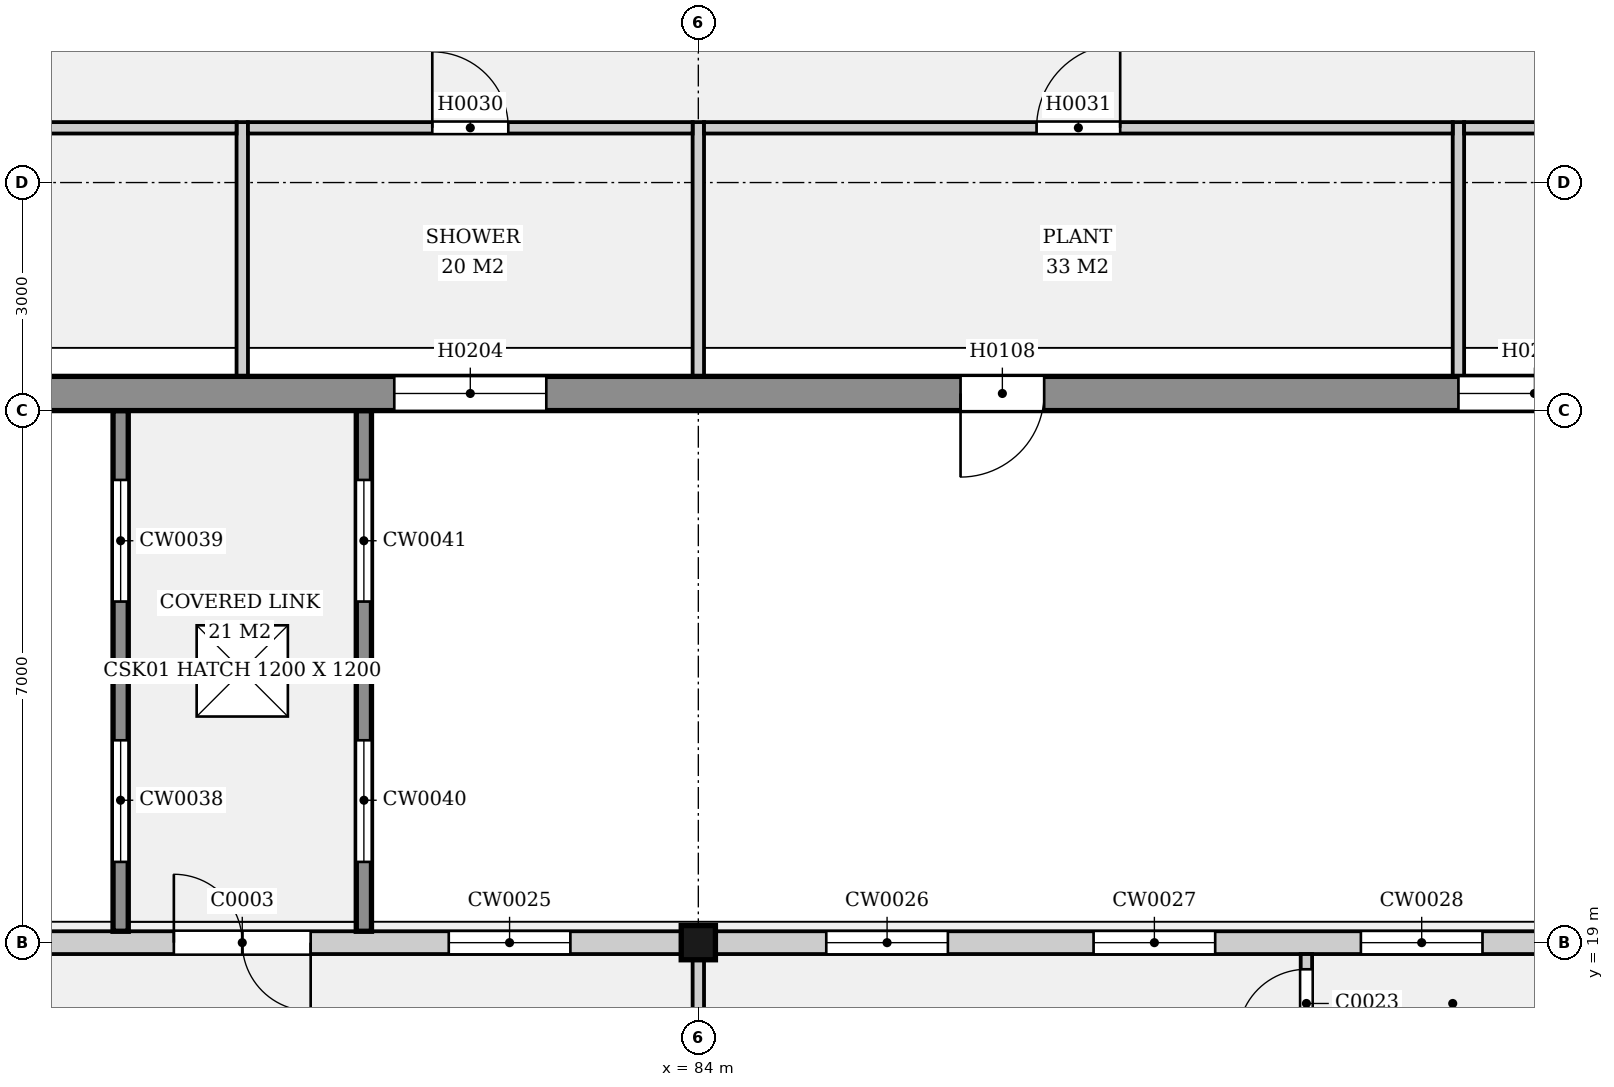
"""IFC4 building model, lengths in metres.
Left out: names, types, materials, properties, quantities, classifications, styles, units other than length and angle.
Written with IfcOpenShell. Run it as: python <this file> out.ifc"""

import sys

from ifc_helpers import new_model, si_unit, direction, frame, frame_2d, origin, origin_2d, place, context, subcontext, project, spatial, rectangle, extrude, element, fill, save


model = new_model("IFC4")
c1 = context("Model", 3, precision=1e-05, world=origin(), true_north=direction((0.0, 1.0)))
c2 = subcontext(c1, "Body", "Model", "MODEL_VIEW")
j1 = project(units=[si_unit("LENGTHUNIT", "METRE"), si_unit("PLANEANGLEUNIT", "RADIAN")], contexts=[c1])
p1 = place(None, origin())
s1 = spatial("IfcSite", under=j1, at=p1, CompositionType="ELEMENT")
p2 = place(p1, origin())
s2 = spatial("IfcBuilding", under=s1, at=p2, CompositionType="ELEMENT")
p3 = place(p2, origin())
s3 = spatial("IfcBuildingStorey", under=s2, at=p3, CompositionType="ELEMENT", Elevation=0.0)
p4 = place(p3, frame((64.0, 26.225, 0.0), z_axis=(0.0, 0.0, 1.0), x_axis=(1.0, 0.0, 0.0)))
e1 = element("IfcWall", 1, at=p4, inside=s3, PredefinedType="ELEMENTEDWALL", context=c2, shape_type="SweptSolid", body=[
    extrude(rectangle(XDim=76.0, YDim=0.45, at=frame_2d((38.0, 0.0))), origin(), (0.0, 0.0, 1.0), 5.0),
])
p5 = place(p4, frame((10.55, 0.0, 0.0), z_axis=(0.0, 0.0, 1.0), x_axis=(-1.0, 0.0, 0.0)))
e2 = element("IfcOpeningElement", 2, at=p5, cuts=e1, PredefinedType="OPENING", context=c2, shape_type="SweptSolid", body=[
    extrude(rectangle(XDim=1.1, YDim=2.2, at=frame_2d((0.55, 1.1))), frame((0.0, 0.235, 0.0), z_axis=(0.0, -1.0, 0.0), x_axis=(1.0, 0.0, 0.0)), (0.0, 0.0, 1.0), 0.47),
])
p6 = place(p4, frame((24.55, 0.0, 0.0), z_axis=(0.0, 0.0, 1.0), x_axis=(-1.0, 0.0, 0.0)))
e3 = element("IfcOpeningElement", 3, at=p6, cuts=e1, PredefinedType="OPENING", context=c2, shape_type="SweptSolid", body=[
    extrude(rectangle(XDim=1.1, YDim=2.2, at=frame_2d((0.55, 1.1))), frame((0.0, 0.235, 0.0), z_axis=(0.0, -1.0, 0.0), x_axis=(1.0, 0.0, 0.0)), (0.0, 0.0, 1.0), 0.47),
])
p7 = place(p4, frame((38.55, 0.0, 0.0), z_axis=(0.0, 0.0, 1.0), x_axis=(-1.0, 0.0, 0.0)))
e4 = element("IfcOpeningElement", 4, at=p7, cuts=e1, PredefinedType="OPENING", context=c2, shape_type="SweptSolid", body=[
    extrude(rectangle(XDim=1.1, YDim=2.2, at=frame_2d((0.55, 1.1))), frame((0.0, 0.235, 0.0), z_axis=(0.0, -1.0, 0.0), x_axis=(1.0, 0.0, 0.0)), (0.0, 0.0, 1.0), 0.47),
])
p8 = place(p4, frame((52.55, 0.0, 0.0), z_axis=(0.0, 0.0, 1.0), x_axis=(-1.0, 0.0, 0.0)))
e5 = element("IfcOpeningElement", 5, at=p8, cuts=e1, PredefinedType="OPENING", context=c2, shape_type="SweptSolid", body=[
    extrude(rectangle(XDim=1.1, YDim=2.2, at=frame_2d((0.55, 1.1))), frame((0.0, 0.235, 0.0), z_axis=(0.0, -1.0, 0.0), x_axis=(1.0, 0.0, 0.0)), (0.0, 0.0, 1.0), 0.47),
])
p9 = place(p4, frame((66.55, 0.0, 0.0), z_axis=(0.0, 0.0, 1.0), x_axis=(-1.0, 0.0, 0.0)))
e6 = element("IfcOpeningElement", 6, at=p9, cuts=e1, PredefinedType="OPENING", context=c2, shape_type="SweptSolid", body=[
    extrude(rectangle(XDim=1.1, YDim=2.2, at=frame_2d((0.55, 1.1))), frame((0.0, 0.235, 0.0), z_axis=(0.0, -1.0, 0.0), x_axis=(1.0, 0.0, 0.0)), (0.0, 0.0, 1.0), 0.47),
])
p10 = place(p4, frame((16.0, 0.0, 3.2)))
e7 = element("IfcOpeningElement", 7, at=p10, cuts=e1, PredefinedType="OPENING", context=c2, shape_type="SweptSolid", body=[
    extrude(rectangle(XDim=2.0, YDim=1.0, at=frame_2d((1.0, 0.5))), frame((0.0, 0.235, 0.0), z_axis=(0.0, -1.0, 0.0), x_axis=(1.0, 0.0, 0.0)), (0.0, 0.0, 1.0), 0.47),
])
p11 = place(p4, frame((30.0, 0.0, 3.2)))
e8 = element("IfcOpeningElement", 8, at=p11, cuts=e1, PredefinedType="OPENING", context=c2, shape_type="SweptSolid", body=[
    extrude(rectangle(XDim=2.0, YDim=1.0, at=frame_2d((1.0, 0.5))), frame((0.0, 0.235, 0.0), z_axis=(0.0, -1.0, 0.0), x_axis=(1.0, 0.0, 0.0)), (0.0, 0.0, 1.0), 0.47),
])
p12 = place(p4, frame((44.0, 0.0, 3.2)))
e9 = element("IfcOpeningElement", 9, at=p12, cuts=e1, PredefinedType="OPENING", context=c2, shape_type="SweptSolid", body=[
    extrude(rectangle(XDim=2.0, YDim=1.0, at=frame_2d((1.0, 0.5))), frame((0.0, 0.235, 0.0), z_axis=(0.0, -1.0, 0.0), x_axis=(1.0, 0.0, 0.0)), (0.0, 0.0, 1.0), 0.47),
])
p13 = place(p4, frame((58.0, 0.0, 3.2)))
e10 = element("IfcOpeningElement", 10, at=p13, cuts=e1, PredefinedType="OPENING", context=c2, shape_type="SweptSolid", body=[
    extrude(rectangle(XDim=2.0, YDim=1.0, at=frame_2d((1.0, 0.5))), frame((0.0, 0.235, 0.0), z_axis=(0.0, -1.0, 0.0), x_axis=(1.0, 0.0, 0.0)), (0.0, 0.0, 1.0), 0.47),
])
p14 = place(p3, frame((84.0, 19.0, -0.25), z_axis=(0.0, 0.0, 1.0), x_axis=(1.0, 0.0, 0.0)))
e11 = element("IfcColumn", 11, at=p14, inside=s3, PredefinedType="COLUMN", context=c2, shape_type="SweptSolid", body=[
    extrude(rectangle(XDim=0.45, YDim=0.45, at=origin_2d()), origin(), (0.0, 0.0, 1.0), 5.25),
])
p15 = place(p3, frame((72.225, 19.0, 0.0), z_axis=(0.0, 0.0, 1.0), x_axis=(1.0, 0.0, 0.0)))
e12 = element("IfcWall", 12, at=p15, inside=s3, PredefinedType="ELEMENTEDWALL", context=c2, shape_type="SweptSolid", body=[
    extrude(rectangle(XDim=11.55, YDim=0.3, at=frame_2d((5.775, 0.0))), origin(), (0.0, 0.0, 1.0), 4.6),
])
p16 = place(p15, frame((1.458, 0.0, 2.5)))
e13 = element("IfcOpeningElement", 13, at=p16, cuts=e12, PredefinedType="OPENING", context=c2, shape_type="SweptSolid", body=[
    extrude(rectangle(XDim=1.6, YDim=1.0, at=frame_2d((0.8, 0.5))), frame((0.0, 0.16, 0.0), z_axis=(0.0, -1.0, 0.0), x_axis=(1.0, 0.0, 0.0)), (0.0, 0.0, 1.0), 0.32),
])
p17 = place(p15, frame((8.492, 0.0, 2.5)))
e14 = element("IfcOpeningElement", 14, at=p17, cuts=e12, PredefinedType="OPENING", context=c2, shape_type="SweptSolid", body=[
    extrude(rectangle(XDim=1.6, YDim=1.0, at=frame_2d((0.8, 0.5))), frame((0.0, 0.16, 0.0), z_axis=(0.0, -1.0, 0.0), x_axis=(1.0, 0.0, 0.0)), (0.0, 0.0, 1.0), 0.32),
])
p18 = place(p15, frame((4.875, 0.0, 0.0)))
e15 = element("IfcOpeningElement", 15, at=p18, cuts=e12, PredefinedType="OPENING", context=c2, shape_type="SweptSolid", body=[
    extrude(rectangle(XDim=1.8, YDim=2.4, at=frame_2d((0.9, 1.2))), frame((0.0, 0.16, 0.0), z_axis=(0.0, -1.0, 0.0), x_axis=(1.0, 0.0, 0.0)), (0.0, 0.0, 1.0), 0.32),
])
p19 = place(p3, frame((84.225, 19.0, 0.0), z_axis=(0.0, 0.0, 1.0), x_axis=(1.0, 0.0, 0.0)))
e16 = element("IfcWall", 16, at=p19, inside=s3, PredefinedType="ELEMENTEDWALL", context=c2, shape_type="SweptSolid", body=[
    extrude(rectangle(XDim=11.55, YDim=0.3, at=frame_2d((5.775, 0.0))), origin(), (0.0, 0.0, 1.0), 4.6),
])
p20 = place(p19, frame((1.458, 0.0, 2.5)))
e17 = element("IfcOpeningElement", 17, at=p20, cuts=e16, PredefinedType="OPENING", context=c2, shape_type="SweptSolid", body=[
    extrude(rectangle(XDim=1.6, YDim=1.0, at=frame_2d((0.8, 0.5))), frame((0.0, 0.16, 0.0), z_axis=(0.0, -1.0, 0.0), x_axis=(1.0, 0.0, 0.0)), (0.0, 0.0, 1.0), 0.32),
])
p21 = place(p19, frame((4.975, 0.0, 2.5)))
e18 = element("IfcOpeningElement", 18, at=p21, cuts=e16, PredefinedType="OPENING", context=c2, shape_type="SweptSolid", body=[
    extrude(rectangle(XDim=1.6, YDim=1.0, at=frame_2d((0.8, 0.5))), frame((0.0, 0.16, 0.0), z_axis=(0.0, -1.0, 0.0), x_axis=(1.0, 0.0, 0.0)), (0.0, 0.0, 1.0), 0.32),
])
p22 = place(p19, frame((8.492, 0.0, 2.5)))
e19 = element("IfcOpeningElement", 19, at=p22, cuts=e16, PredefinedType="OPENING", context=c2, shape_type="SweptSolid", body=[
    extrude(rectangle(XDim=1.6, YDim=1.0, at=frame_2d((0.8, 0.5))), frame((0.0, 0.16, 0.0), z_axis=(0.0, -1.0, 0.0), x_axis=(1.0, 0.0, 0.0)), (0.0, 0.0, 1.0), 0.32),
])
p23 = place(p3, frame((76.4, 19.15, 0.0), z_axis=(0.0, 0.0, 1.0), x_axis=(0.0, 1.0, 0.0)))
e20 = element("IfcWall", 20, at=p23, inside=s3, PredefinedType="ELEMENTEDWALL", context=c2, shape_type="SweptSolid", body=[
    extrude(rectangle(XDim=6.85, YDim=0.2, at=frame_2d((3.425, 0.0))), origin(), (0.0, 0.0, 1.0), 3.2),
])
p24 = place(p23, frame((0.913, 0.0, 0.9)))
e21 = element("IfcOpeningElement", 21, at=p24, cuts=e20, PredefinedType="OPENING", context=c2, shape_type="SweptSolid", body=[
    extrude(rectangle(XDim=1.6, YDim=1.6, at=frame_2d((0.8, 0.8))), frame((0.0, 0.11, 0.0), z_axis=(0.0, -1.0, 0.0), x_axis=(1.0, 0.0, 0.0)), (0.0, 0.0, 1.0), 0.22),
])
p25 = place(p23, frame((4.337, 0.0, 0.9)))
e22 = element("IfcOpeningElement", 22, at=p25, cuts=e20, PredefinedType="OPENING", context=c2, shape_type="SweptSolid", body=[
    extrude(rectangle(XDim=1.6, YDim=1.6, at=frame_2d((0.8, 0.8))), frame((0.0, 0.11, 0.0), z_axis=(0.0, -1.0, 0.0), x_axis=(1.0, 0.0, 0.0)), (0.0, 0.0, 1.0), 0.22),
])
p26 = place(p3, frame((79.6, 19.15, 0.0), z_axis=(0.0, 0.0, 1.0), x_axis=(0.0, 1.0, 0.0)))
e23 = element("IfcWall", 23, at=p26, inside=s3, PredefinedType="ELEMENTEDWALL", context=c2, shape_type="SweptSolid", body=[
    extrude(rectangle(XDim=6.85, YDim=0.2, at=frame_2d((3.425, 0.0))), origin(), (0.0, 0.0, 1.0), 3.2),
])
p27 = place(p26, frame((0.913, 0.0, 0.9)))
e24 = element("IfcOpeningElement", 24, at=p27, cuts=e23, PredefinedType="OPENING", context=c2, shape_type="SweptSolid", body=[
    extrude(rectangle(XDim=1.6, YDim=1.6, at=frame_2d((0.8, 0.8))), frame((0.0, 0.11, 0.0), z_axis=(0.0, -1.0, 0.0), x_axis=(1.0, 0.0, 0.0)), (0.0, 0.0, 1.0), 0.22),
])
p28 = place(p26, frame((4.337, 0.0, 0.9)))
e25 = element("IfcOpeningElement", 25, at=p28, cuts=e23, PredefinedType="OPENING", context=c2, shape_type="SweptSolid", body=[
    extrude(rectangle(XDim=1.6, YDim=1.6, at=frame_2d((0.8, 0.8))), frame((0.0, 0.11, 0.0), z_axis=(0.0, -1.0, 0.0), x_axis=(1.0, 0.0, 0.0)), (0.0, 0.0, 1.0), 0.22),
])
p29 = place(p3, frame((64.0, 29.72, 0.0), z_axis=(0.0, 0.0, 1.0), x_axis=(1.0, 0.0, 0.0)))
e26 = element("IfcWall", 26, at=p29, inside=s3, PredefinedType="PARTITIONING", context=c2, shape_type="SweptSolid", body=[
    extrude(rectangle(XDim=13.925, YDim=0.15, at=frame_2d((6.962, 0.0))), origin(), (0.0, 0.0, 1.0), 4.75),
])
p30 = place(p29, frame((6.45, 0.0, 0.0)))
e27 = element("IfcOpeningElement", 27, at=p30, cuts=e26, PredefinedType="OPENING", context=c2, shape_type="SweptSolid", body=[
    extrude(rectangle(XDim=1.1, YDim=2.1, at=frame_2d((0.55, 1.05))), frame((0.0, 0.085, 0.0), z_axis=(0.0, -1.0, 0.0), x_axis=(1.0, 0.0, 0.0)), (0.0, 0.0, 1.0), 0.17),
])
p31 = place(p3, frame((78.0, 26.45, 0.0), z_axis=(0.0, 0.0, 1.0), x_axis=(0.0, 1.0, 0.0)))
e28 = element("IfcWall", 28, at=p31, inside=s3, PredefinedType="PARTITIONING", context=c2, shape_type="SweptSolid", body=[
    extrude(rectangle(XDim=3.345, YDim=0.15, at=frame_2d((1.672, 0.0))), origin(), (0.0, 0.0, 1.0), 4.75),
])
p32 = place(p3, frame((78.075, 29.72, 0.0), z_axis=(0.0, 0.0, 1.0), x_axis=(1.0, 0.0, 0.0)))
e29 = element("IfcWall", 29, at=p32, inside=s3, PredefinedType="PARTITIONING", context=c2, shape_type="SweptSolid", body=[
    extrude(rectangle(XDim=5.85, YDim=0.15, at=frame_2d((2.925, 0.0))), origin(), (0.0, 0.0, 1.0), 4.75),
])
p33 = place(p32, frame((2.425, 0.0, 0.0)))
e30 = element("IfcOpeningElement", 30, at=p33, cuts=e29, PredefinedType="OPENING", context=c2, shape_type="SweptSolid", body=[
    extrude(rectangle(XDim=1.0, YDim=2.1, at=frame_2d((0.5, 1.05))), frame((0.0, 0.085, 0.0), z_axis=(0.0, -1.0, 0.0), x_axis=(1.0, 0.0, 0.0)), (0.0, 0.0, 1.0), 0.17),
])
p34 = place(p3, frame((84.0, 26.45, 0.0), z_axis=(0.0, 0.0, 1.0), x_axis=(0.0, 1.0, 0.0)))
e31 = element("IfcWall", 31, at=p34, inside=s3, PredefinedType="PARTITIONING", context=c2, shape_type="SweptSolid", body=[
    extrude(rectangle(XDim=3.345, YDim=0.15, at=frame_2d((1.672, 0.0))), origin(), (0.0, 0.0, 1.0), 4.75),
])
p35 = place(p3, frame((84.075, 29.72, 0.0), z_axis=(0.0, 0.0, 1.0), x_axis=(1.0, 0.0, 0.0)))
e32 = element("IfcWall", 32, at=p35, inside=s3, PredefinedType="PARTITIONING", context=c2, shape_type="SweptSolid", body=[
    extrude(rectangle(XDim=9.85, YDim=0.15, at=frame_2d((4.925, 0.0))), origin(), (0.0, 0.0, 1.0), 4.75),
])
p36 = place(p35, frame((4.375, 0.0, 0.0)))
e33 = element("IfcOpeningElement", 33, at=p36, cuts=e32, PredefinedType="OPENING", context=c2, shape_type="SweptSolid", body=[
    extrude(rectangle(XDim=1.1, YDim=2.1, at=frame_2d((0.55, 1.05))), frame((0.0, 0.085, 0.0), z_axis=(0.0, -1.0, 0.0), x_axis=(1.0, 0.0, 0.0)), (0.0, 0.0, 1.0), 0.17),
])
p37 = place(p3, frame((94.0, 26.45, 0.0), z_axis=(0.0, 0.0, 1.0), x_axis=(0.0, 1.0, 0.0)))
e34 = element("IfcWall", 34, at=p37, inside=s3, PredefinedType="PARTITIONING", context=c2, shape_type="SweptSolid", body=[
    extrude(rectangle(XDim=3.345, YDim=0.15, at=frame_2d((1.672, 0.0))), origin(), (0.0, 0.0, 1.0), 4.75),
])
p38 = place(p3, frame((94.075, 29.72, 0.0), z_axis=(0.0, 0.0, 1.0), x_axis=(1.0, 0.0, 0.0)))
e35 = element("IfcWall", 35, at=p38, inside=s3, PredefinedType="PARTITIONING", context=c2, shape_type="SweptSolid", body=[
    extrude(rectangle(XDim=9.65, YDim=0.15, at=frame_2d((4.825, 0.0))), origin(), (0.0, 0.0, 1.0), 4.75),
])
p39 = place(p38, frame((4.325, 0.0, 0.0)))
e36 = element("IfcOpeningElement", 36, at=p39, cuts=e35, PredefinedType="OPENING", context=c2, shape_type="SweptSolid", body=[
    extrude(rectangle(XDim=1.0, YDim=2.1, at=frame_2d((0.5, 1.05))), frame((0.0, 0.085, 0.0), z_axis=(0.0, -1.0, 0.0), x_axis=(1.0, 0.0, 0.0)), (0.0, 0.0, 1.0), 0.17),
])
p40 = place(p3, frame((84.0, 14.375, 0.0), z_axis=(0.0, 0.0, 1.0), x_axis=(0.0, 1.0, 0.0)))
e37 = element("IfcWall", 37, at=p40, inside=s3, PredefinedType="PARTITIONING", context=c2, shape_type="SweptSolid", body=[
    extrude(rectangle(XDim=4.4, YDim=0.15, at=frame_2d((2.2, 0.0))), origin(), (0.0, 0.0, 1.0), 4.6),
])
p41 = place(p3, frame((92.0, 14.375, 0.0), z_axis=(0.0, 0.0, 1.0), x_axis=(0.0, 1.0, 0.0)))
e38 = element("IfcWall", 38, at=p41, inside=s3, PredefinedType="PARTITIONING", context=c2, shape_type="SweptSolid", body=[
    extrude(rectangle(XDim=4.475, YDim=0.15, at=frame_2d((2.238, 0.0))), origin(), (0.0, 0.0, 1.0), 4.6),
])
p42 = place(p41, frame((3.375, 0.0, 0.0)))
e39 = element("IfcOpeningElement", 39, at=p42, cuts=e38, PredefinedType="OPENING", context=c2, shape_type="SweptSolid", body=[
    extrude(rectangle(XDim=0.9, YDim=2.1, at=frame_2d((0.45, 1.05))), frame((0.0, 0.085, 0.0), z_axis=(0.0, -1.0, 0.0), x_axis=(1.0, 0.0, 0.0)), (0.0, 0.0, 1.0), 0.17),
])
p43 = place(p3, frame((0.0, 0.0, 3.2)))
p44 = place(p43, frame((78.0, 22.575, 0.0)))
p45 = place(p44, frame((0.0, 0.0, 0.15)))
e40 = element("IfcWindow", 40, at=p45, inside=s3, PartitioningType="SINGLE_PANEL", PredefinedType="SKYLIGHT", context=c2, shape_type="SweptSolid", body=[
    extrude(rectangle(XDim=1.2, YDim=1.2, at=origin_2d()), origin(), (0.0, 0.0, 1.0), 0.05),
])
p46 = place(p6, origin())
e41 = element("IfcDoor", 41, at=p46, inside=s3, OperationType="SINGLE_SWING_LEFT", PredefinedType="DOOR", context=c2, shape_type="SweptSolid", body=[
    extrude(rectangle(XDim=1.1, YDim=2.2, at=frame_2d((0.55, 1.1))), frame((0.0, 0.025, 0.0), z_axis=(0.0, -1.0, 0.0), x_axis=(1.0, 0.0, 0.0)), (0.0, 0.0, 1.0), 0.05),
])
fill(e3, e41)
p47 = place(p10, origin())
e42 = element("IfcWindow", 42, at=p47, inside=s3, PartitioningType="SINGLE_PANEL", PredefinedType="WINDOW", context=c2, shape_type="SweptSolid", body=[
    extrude(rectangle(XDim=2.0, YDim=1.0, at=frame_2d((1.0, 0.5))), frame((0.0, 0.03, 0.0), z_axis=(0.0, -1.0, 0.0), x_axis=(1.0, 0.0, 0.0)), (0.0, 0.0, 1.0), 0.06),
])
fill(e7, e42)
p48 = place(p11, origin())
e43 = element("IfcWindow", 43, at=p48, inside=s3, PartitioningType="SINGLE_PANEL", PredefinedType="WINDOW", context=c2, shape_type="SweptSolid", body=[
    extrude(rectangle(XDim=2.0, YDim=1.0, at=frame_2d((1.0, 0.5))), frame((0.0, 0.03, 0.0), z_axis=(0.0, -1.0, 0.0), x_axis=(1.0, 0.0, 0.0)), (0.0, 0.0, 1.0), 0.06),
])
fill(e8, e43)
p49 = place(p17, origin())
e44 = element("IfcWindow", 44, at=p49, inside=s3, PartitioningType="SINGLE_PANEL", PredefinedType="WINDOW", context=c2, shape_type="SweptSolid", body=[
    extrude(rectangle(XDim=1.6, YDim=1.0, at=frame_2d((0.8, 0.5))), frame((0.0, 0.03, 0.0), z_axis=(0.0, -1.0, 0.0), x_axis=(1.0, 0.0, 0.0)), (0.0, 0.0, 1.0), 0.06),
])
fill(e14, e44)
p50 = place(p20, origin())
e45 = element("IfcWindow", 45, at=p50, inside=s3, PartitioningType="SINGLE_PANEL", PredefinedType="WINDOW", context=c2, shape_type="SweptSolid", body=[
    extrude(rectangle(XDim=1.6, YDim=1.0, at=frame_2d((0.8, 0.5))), frame((0.0, 0.03, 0.0), z_axis=(0.0, -1.0, 0.0), x_axis=(1.0, 0.0, 0.0)), (0.0, 0.0, 1.0), 0.06),
])
fill(e17, e45)
p51 = place(p21, origin())
e46 = element("IfcWindow", 46, at=p51, inside=s3, PartitioningType="SINGLE_PANEL", PredefinedType="WINDOW", context=c2, shape_type="SweptSolid", body=[
    extrude(rectangle(XDim=1.6, YDim=1.0, at=frame_2d((0.8, 0.5))), frame((0.0, 0.03, 0.0), z_axis=(0.0, -1.0, 0.0), x_axis=(1.0, 0.0, 0.0)), (0.0, 0.0, 1.0), 0.06),
])
fill(e18, e46)
p52 = place(p22, origin())
e47 = element("IfcWindow", 47, at=p52, inside=s3, PartitioningType="SINGLE_PANEL", PredefinedType="WINDOW", context=c2, shape_type="SweptSolid", body=[
    extrude(rectangle(XDim=1.6, YDim=1.0, at=frame_2d((0.8, 0.5))), frame((0.0, 0.03, 0.0), z_axis=(0.0, -1.0, 0.0), x_axis=(1.0, 0.0, 0.0)), (0.0, 0.0, 1.0), 0.06),
])
fill(e19, e47)
p53 = place(p18, origin())
e48 = element("IfcDoor", 48, at=p53, inside=s3, OperationType="DOUBLE_DOOR_SINGLE_SWING", PredefinedType="DOOR", context=c2, shape_type="SweptSolid", body=[
    extrude(rectangle(XDim=1.8, YDim=2.4, at=frame_2d((0.9, 1.2))), frame((0.0, 0.025, 0.0), z_axis=(0.0, -1.0, 0.0), x_axis=(1.0, 0.0, 0.0)), (0.0, 0.0, 1.0), 0.05),
])
fill(e15, e48)
p54 = place(p24, origin())
e49 = element("IfcWindow", 49, at=p54, inside=s3, PartitioningType="SINGLE_PANEL", PredefinedType="WINDOW", context=c2, shape_type="SweptSolid", body=[
    extrude(rectangle(XDim=1.6, YDim=1.6, at=frame_2d((0.8, 0.8))), frame((0.0, 0.03, 0.0), z_axis=(0.0, -1.0, 0.0), x_axis=(1.0, 0.0, 0.0)), (0.0, 0.0, 1.0), 0.06),
])
fill(e21, e49)
p55 = place(p25, origin())
e50 = element("IfcWindow", 50, at=p55, inside=s3, PartitioningType="SINGLE_PANEL", PredefinedType="WINDOW", context=c2, shape_type="SweptSolid", body=[
    extrude(rectangle(XDim=1.6, YDim=1.6, at=frame_2d((0.8, 0.8))), frame((0.0, 0.03, 0.0), z_axis=(0.0, -1.0, 0.0), x_axis=(1.0, 0.0, 0.0)), (0.0, 0.0, 1.0), 0.06),
])
fill(e22, e50)
p56 = place(p27, origin())
e51 = element("IfcWindow", 51, at=p56, inside=s3, PartitioningType="SINGLE_PANEL", PredefinedType="WINDOW", context=c2, shape_type="SweptSolid", body=[
    extrude(rectangle(XDim=1.6, YDim=1.6, at=frame_2d((0.8, 0.8))), frame((0.0, 0.03, 0.0), z_axis=(0.0, -1.0, 0.0), x_axis=(1.0, 0.0, 0.0)), (0.0, 0.0, 1.0), 0.06),
])
fill(e24, e51)
p57 = place(p28, origin())
e52 = element("IfcWindow", 52, at=p57, inside=s3, PartitioningType="SINGLE_PANEL", PredefinedType="WINDOW", context=c2, shape_type="SweptSolid", body=[
    extrude(rectangle(XDim=1.6, YDim=1.6, at=frame_2d((0.8, 0.8))), frame((0.0, 0.03, 0.0), z_axis=(0.0, -1.0, 0.0), x_axis=(1.0, 0.0, 0.0)), (0.0, 0.0, 1.0), 0.06),
])
fill(e25, e52)
p58 = place(p33, origin())
e53 = element("IfcDoor", 53, at=p58, inside=s3, OperationType="SINGLE_SWING_LEFT", PredefinedType="DOOR", context=c2, shape_type="SweptSolid", body=[
    extrude(rectangle(XDim=1.0, YDim=2.1, at=frame_2d((0.5, 1.05))), frame((0.0, 0.025, 0.0), z_axis=(0.0, -1.0, 0.0), x_axis=(1.0, 0.0, 0.0)), (0.0, 0.0, 1.0), 0.05),
])
fill(e30, e53)
p59 = place(p36, origin())
e54 = element("IfcDoor", 54, at=p59, inside=s3, OperationType="SINGLE_SWING_RIGHT", PredefinedType="DOOR", context=c2, shape_type="SweptSolid", body=[
    extrude(rectangle(XDim=1.1, YDim=2.1, at=frame_2d((0.55, 1.05))), frame((0.0, 0.025, 0.0), z_axis=(0.0, -1.0, 0.0), x_axis=(1.0, 0.0, 0.0)), (0.0, 0.0, 1.0), 0.05),
])
fill(e33, e54)
p60 = place(p42, origin())
e55 = element("IfcDoor", 55, at=p60, inside=s3, OperationType="SINGLE_SWING_LEFT", PredefinedType="DOOR", context=c2, shape_type="SweptSolid", body=[
    extrude(rectangle(XDim=0.9, YDim=2.1, at=frame_2d((0.45, 1.05))), frame((0.0, 0.025, 0.0), z_axis=(0.0, -1.0, 0.0), x_axis=(1.0, 0.0, 0.0)), (0.0, 0.0, 1.0), 0.05),
])
fill(e39, e55)
save(model, sys.argv[1])
